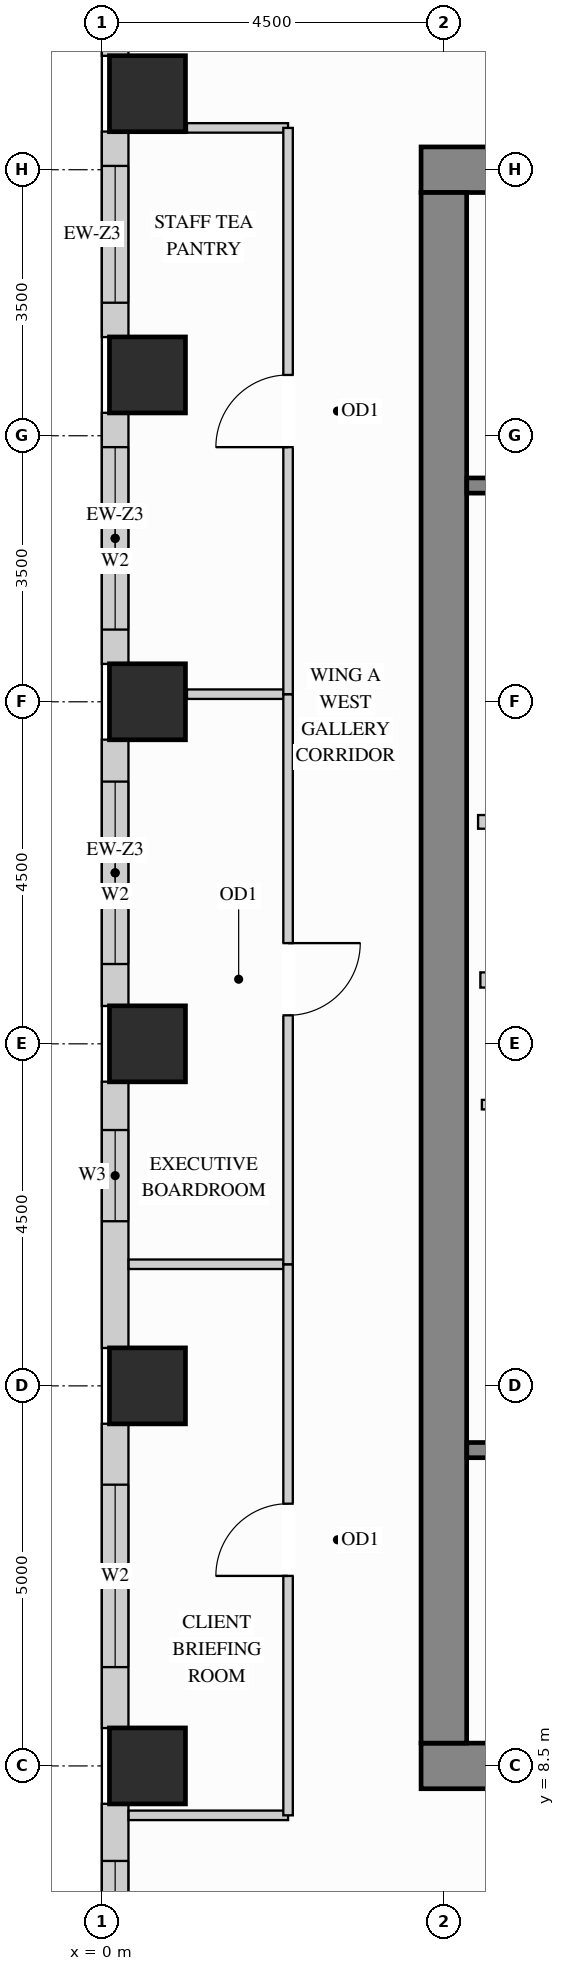
"""IFC4 building model, lengths in metres.
Left out: names, types, materials, properties, quantities, classifications, styles, units other than length and angle.
Written with IfcOpenShell. Run it as: python <this file> out.ifc"""

import sys

from ifc_helpers import new_model, si_unit, direction, frame, frame_2d, origin, origin_2d, place, context, subcontext, project, spatial, rectangle, extrude, source, transform, mapped, element, fill, save


model = new_model("IFC4")
c1 = context("Model", 3, precision=1e-05, world=origin(), true_north=direction((0.0, 1.0)))
c2 = subcontext(c1, "Body", "Model", "MODEL_VIEW")
j1 = project(units=[si_unit("LENGTHUNIT", "METRE"), si_unit("PLANEANGLEUNIT", "RADIAN")], contexts=[c1])
p1 = place(None, origin())
s1 = spatial("IfcSite", under=j1, at=p1, CompositionType="ELEMENT")
p2 = place(p1, origin())
s2 = spatial("IfcBuilding", under=s1, at=p2, CompositionType="ELEMENT")
p3 = place(p2, frame((0.0, 0.0, 171.9)))
s3 = spatial("IfcBuildingStorey", under=s2, at=p3, CompositionType="ELEMENT", Elevation=171.9)
m1 = source(origin(), c2, "Body", "SweptSolid", [
    extrude(rectangle(XDim=1.0, YDim=1.0, at=origin_2d()), origin(), (0.0, 0.0, 1.0), 3.4),
])
for number, where, z_axis, x_axis in (
    (1, (0.6, 13.5, 0.0), (0.0, 0.0, 1.0), (1.0, 0.0, 0.0)),
    (2, (0.6, 18.0, 0.0), (0.0, 0.0, 1.0), (1.0, 0.0, 0.0)),
    (3, (0.6, 22.5, 0.0), (0.0, 0.0, 1.0), (1.0, 0.0, 0.0)),
    (4, (0.6, 26.8, 0.0), (0.0, 0.0, 1.0), (1.0, 0.0, 0.0)),
    (5, (0.6, 30.5, 0.0), (0.0, 0.0, 1.0), (1.0, 0.0, 0.0)),
    (6, (0.6, 8.5, 0.0), (0.0, 0.0, 1.0), (1.0, 0.0, 0.0)),
):
    element("IfcColumn", number, at=place(p3, frame(where, z_axis=z_axis, x_axis=x_axis)), inside=s3, PredefinedType="COLUMN", context=c2, shape_type="MappedRepresentation", body=[
        mapped(m1, transform((0.0, 0.0, 0.0), x_axis=(1.0, 0.0, 0.0), y_axis=(0.0, 1.0, 0.0), z_axis=(0.0, 0.0, 1.0))),
    ])
m2 = source(origin(), c2, "Body", "SweptSolid", [
    extrude(rectangle(XDim=10.6, YDim=0.6, at=frame_2d((5.3, 0.0))), origin(), (0.0, 0.0, 1.0), 3.4),
])
for number, where, z_axis, x_axis in (
    (7, (4.2, 29.5, 0.0), (0.0, 0.0, 1.0), (1.0, 0.0, 0.0)),
    (8, (4.2, 8.5, 0.0), (0.0, 0.0, 1.0), (1.0, 0.0, 0.0)),
):
    element("IfcWall", number, at=place(p3, frame(where, z_axis=z_axis, x_axis=x_axis)), inside=s3, PredefinedType="SHEAR", context=c2, shape_type="MappedRepresentation", body=[
        mapped(m2, transform((0.0, 0.0, 0.0), x_axis=(1.0, 0.0, 0.0), y_axis=(0.0, 1.0, 0.0), z_axis=(0.0, 0.0, 1.0))),
    ])
m3 = source(origin(), c2, "Body", "SweptSolid", [
    extrude(rectangle(XDim=20.4, YDim=0.6, at=frame_2d((10.2, 0.0))), origin(), (0.0, 0.0, 1.0), 3.4),
])
p4 = place(p3, frame((4.5, 8.8, 0.0), z_axis=(0.0, 0.0, 1.0), x_axis=(0.0, 1.0, 0.0)))
e9 = element("IfcWall", 9, at=p4, inside=s3, PredefinedType="SHEAR", context=c2, shape_type="MappedRepresentation", body=[
    mapped(m3, transform((0.0, 0.0, 0.0), x_axis=(1.0, 0.0, 0.0), y_axis=(0.0, 1.0, 0.0), z_axis=(0.0, 0.0, 1.0))),
])
p5 = place(p3, frame((0.175, 34.502, 0.0), z_axis=(0.0, 0.0, 1.0), x_axis=(0.0, -1.0, 0.0)))
e10 = element("IfcWall", 10, at=p5, inside=s3, PredefinedType="SOLIDWALL", context=c2, shape_type="SweptSolid", body=[
    extrude(rectangle(XDim=3.504, YDim=0.35, at=frame_2d((1.752, 0.0))), origin(), (0.0, 0.0, 1.0), 2.612),
])
p6 = place(p5, frame((0.511, 0.0, 0.78)))
e11 = element("IfcOpeningElement", 11, at=p6, cuts=e10, PredefinedType="OPENING", context=c2, shape_type="SweptSolid", body=[
    extrude(rectangle(XDim=1.2, YDim=1.652, at=frame_2d((0.6, 0.826))), frame((0.0, 0.185, 0.0), z_axis=(0.0, -1.0, 0.0), x_axis=(1.0, 0.0, 0.0)), (0.0, 0.0, 1.0), 0.37),
])
p7 = place(p3, frame((0.175, 30.002, 0.0), z_axis=(0.0, 0.0, 1.0), x_axis=(0.0, -1.0, 0.0)))
e12 = element("IfcWall", 12, at=p7, inside=s3, PredefinedType="SOLIDWALL", context=c2, shape_type="SweptSolid", body=[
    extrude(rectangle(XDim=2.704, YDim=0.35, at=frame_2d((1.352, 0.0))), origin(), (0.0, 0.0, 1.0), 2.612),
])
p8 = place(p7, frame((0.452, 0.0, 0.78)))
e13 = element("IfcOpeningElement", 13, at=p8, cuts=e12, PredefinedType="OPENING", context=c2, shape_type="SweptSolid", body=[
    extrude(rectangle(XDim=1.8, YDim=1.652, at=frame_2d((0.9, 0.826))), frame((0.0, 0.185, 0.0), z_axis=(0.0, -1.0, 0.0), x_axis=(1.0, 0.0, 0.0)), (0.0, 0.0, 1.0), 0.37),
])
p9 = place(p3, frame((0.175, 26.302, 0.0), z_axis=(0.0, 0.0, 1.0), x_axis=(0.0, -1.0, 0.0)))
e14 = element("IfcWall", 14, at=p9, inside=s3, PredefinedType="SOLIDWALL", context=c2, shape_type="SweptSolid", body=[
    extrude(rectangle(XDim=3.304, YDim=0.35, at=frame_2d((1.652, 0.0))), origin(), (0.0, 0.0, 1.0), 2.612),
])
p10 = place(p9, frame((0.452, 0.0, 0.78)))
e15 = element("IfcOpeningElement", 15, at=p10, cuts=e14, PredefinedType="OPENING", context=c2, shape_type="SweptSolid", body=[
    extrude(rectangle(XDim=2.4, YDim=1.652, at=frame_2d((1.2, 0.826))), frame((0.0, 0.185, 0.0), z_axis=(0.0, -1.0, 0.0), x_axis=(1.0, 0.0, 0.0)), (0.0, 0.0, 1.0), 0.37),
])
p11 = place(p3, frame((0.175, 22.002, 0.0), z_axis=(0.0, 0.0, 1.0), x_axis=(0.0, -1.0, 0.0)))
e16 = element("IfcWall", 16, at=p11, inside=s3, PredefinedType="SOLIDWALL", context=c2, shape_type="SweptSolid", body=[
    extrude(rectangle(XDim=3.504, YDim=0.35, at=frame_2d((1.752, 0.0))), origin(), (0.0, 0.0, 1.0), 2.612),
])
p12 = place(p11, frame((0.552, 0.0, 0.78)))
e17 = element("IfcOpeningElement", 17, at=p12, cuts=e16, PredefinedType="OPENING", context=c2, shape_type="SweptSolid", body=[
    extrude(rectangle(XDim=2.4, YDim=1.652, at=frame_2d((1.2, 0.826))), frame((0.0, 0.185, 0.0), z_axis=(0.0, -1.0, 0.0), x_axis=(1.0, 0.0, 0.0)), (0.0, 0.0, 1.0), 0.37),
])
p13 = place(p3, frame((0.175, 17.502, 0.0), z_axis=(0.0, 0.0, 1.0), x_axis=(0.0, -1.0, 0.0)))
e18 = element("IfcWall", 18, at=p13, inside=s3, PredefinedType="SOLIDWALL", context=c2, shape_type="SweptSolid", body=[
    extrude(rectangle(XDim=3.504, YDim=0.35, at=frame_2d((1.752, 0.0))), origin(), (0.0, 0.0, 1.0), 2.612),
])
p14 = place(p13, frame((0.636, 0.0, 0.78)))
e19 = element("IfcOpeningElement", 19, at=p14, cuts=e18, PredefinedType="OPENING", context=c2, shape_type="SweptSolid", body=[
    extrude(rectangle(XDim=1.2, YDim=1.652, at=frame_2d((0.6, 0.826))), frame((0.0, 0.185, 0.0), z_axis=(0.0, -1.0, 0.0), x_axis=(1.0, 0.0, 0.0)), (0.0, 0.0, 1.0), 0.37),
])
p15 = place(p3, frame((0.175, 13.002, 0.0), z_axis=(0.0, 0.0, 1.0), x_axis=(0.0, -1.0, 0.0)))
e20 = element("IfcWall", 20, at=p15, inside=s3, PredefinedType="SOLIDWALL", context=c2, shape_type="SweptSolid", body=[
    extrude(rectangle(XDim=4.004, YDim=0.35, at=frame_2d((2.002, 0.0))), origin(), (0.0, 0.0, 1.0), 2.612),
])
p16 = place(p15, frame((0.802, 0.0, 0.78)))
e21 = element("IfcOpeningElement", 21, at=p16, cuts=e20, PredefinedType="OPENING", context=c2, shape_type="SweptSolid", body=[
    extrude(rectangle(XDim=2.4, YDim=1.652, at=frame_2d((1.2, 0.826))), frame((0.0, 0.185, 0.0), z_axis=(0.0, -1.0, 0.0), x_axis=(1.0, 0.0, 0.0)), (0.0, 0.0, 1.0), 0.37),
])
p17 = place(p3, frame((0.175, 8.002, 0.0), z_axis=(0.0, 0.0, 1.0), x_axis=(0.0, -1.0, 0.0)))
e22 = element("IfcWall", 22, at=p17, inside=s3, PredefinedType="SOLIDWALL", context=c2, shape_type="SweptSolid", body=[
    extrude(rectangle(XDim=4.004, YDim=0.35, at=frame_2d((2.002, 0.0))), origin(), (0.0, 0.0, 1.0), 2.612),
])
p18 = place(p17, frame((0.752, 0.0, 0.78)))
e23 = element("IfcOpeningElement", 23, at=p18, cuts=e22, PredefinedType="OPENING", context=c2, shape_type="SweptSolid", body=[
    extrude(rectangle(XDim=1.2, YDim=1.652, at=frame_2d((0.6, 0.826))), frame((0.0, 0.185, 0.0), z_axis=(0.0, -1.0, 0.0), x_axis=(1.0, 0.0, 0.0)), (0.0, 0.0, 1.0), 0.37),
])
m4 = source(origin(), c2, "Body", "SweptSolid", [
    extrude(rectangle(XDim=2.2, YDim=0.18, at=frame_2d((1.1, 0.0))), origin(), (0.0, 0.0, 1.0), 3.385),
])
p19 = place(p3, frame((4.95, 20.92, 0.0), z_axis=(0.0, 0.0, 1.0), x_axis=(1.0, 0.0, 0.0)))
e24 = element("IfcWall", 24, at=p19, inside=s3, PredefinedType="PARTITIONING", context=c2, shape_type="MappedRepresentation", body=[
    mapped(m4, transform((0.0, 0.0, 0.0), x_axis=(1.0, 0.0, 0.0), y_axis=(0.0, 1.0, 0.0), z_axis=(0.0, 0.0, 1.0))),
])
p20 = place(p3, frame((5.0, 17.2, 0.0), z_axis=(0.0, 0.0, 1.0), x_axis=(1.0, 0.0, 0.0)))
e25 = element("IfcWall", 25, at=p20, inside=s3, PredefinedType="PARTITIONING", context=c2, shape_type="SweptSolid", body=[
    extrude(rectangle(XDim=2.4, YDim=0.125, at=frame_2d((1.2, 0.0))), origin(), (0.0, 0.0, 1.0), 3.385),
])
p21 = place(p20, frame((0.7, 0.0, 0.0)))
e26 = element("IfcOpeningElement", 26, at=p21, cuts=e25, PredefinedType="OPENING", context=c2, shape_type="SweptSolid", body=[
    extrude(rectangle(XDim=0.85, YDim=2.1, at=frame_2d((0.425, 1.05))), frame((0.0, 0.073, 0.0), z_axis=(0.0, -1.0, 0.0), x_axis=(1.0, 0.0, 0.0)), (0.0, 0.0, 1.0), 0.145),
])
m5 = source(origin(), c2, "Body", "SweptSolid", [
    extrude(rectangle(XDim=1.33, YDim=0.125, at=frame_2d((0.665, 0.0))), origin(), (0.0, 0.0, 1.0), 3.385),
])
p22 = place(p3, frame((1.12, 30.05, 0.0), z_axis=(0.0, 0.0, 1.0), x_axis=(1.0, 0.0, 0.0)))
e27 = element("IfcWall", 27, at=p22, inside=s3, PredefinedType="PARTITIONING", context=c2, shape_type="MappedRepresentation", body=[
    mapped(m5, transform((0.0, 0.0, 0.0), x_axis=(1.0, 0.0, 0.0), y_axis=(0.0, 1.0, 0.0), z_axis=(0.0, 0.0, 1.0))),
])
m6 = source(origin(), c2, "Body", "SweptSolid", [
    extrude(rectangle(XDim=2.098, YDim=0.125, at=frame_2d((1.049, 0.0))), origin(), (0.0, 0.0, 1.0), 3.385),
])
for number, where, z_axis, x_axis in (
    (28, (0.352, 7.85, 0.0), (0.0, 0.0, 1.0), (1.0, 0.0, 0.0)),
    (29, (0.352, 15.1, 0.0), (0.0, 0.0, 1.0), (1.0, 0.0, 0.0)),
):
    element("IfcWall", number, at=place(p3, frame(where, z_axis=z_axis, x_axis=x_axis)), inside=s3, PredefinedType="PARTITIONING", context=c2, shape_type="MappedRepresentation", body=[
        mapped(m6, transform((0.0, 0.0, 0.0), x_axis=(1.0, 0.0, 0.0), y_axis=(0.0, 1.0, 0.0), z_axis=(0.0, 0.0, 1.0))),
    ])
p23 = place(p3, frame((1.12, 22.6, 0.0), z_axis=(0.0, 0.0, 1.0), x_axis=(1.0, 0.0, 0.0)))
e30 = element("IfcWall", 30, at=p23, inside=s3, PredefinedType="PARTITIONING", context=c2, shape_type="MappedRepresentation", body=[
    mapped(m5, transform((0.0, 0.0, 0.0), x_axis=(1.0, 0.0, 0.0), y_axis=(0.0, 1.0, 0.0), z_axis=(0.0, 0.0, 1.0))),
])
p24 = place(p3, frame((2.45, 7.85, 0.0), z_axis=(0.0, 0.0, 1.0), x_axis=(0.0, 1.0, 0.0)))
e31 = element("IfcWall", 31, at=p24, inside=s3, PredefinedType="PARTITIONING", context=c2, shape_type="SweptSolid", body=[
    extrude(rectangle(XDim=7.25, YDim=0.125, at=frame_2d((3.625, 0.0))), origin(), (0.0, 0.0, 1.0), 3.385),
])
p25 = place(p24, frame((3.15, 0.0, 0.0)))
e32 = element("IfcOpeningElement", 32, at=p25, cuts=e31, PredefinedType="OPENING", context=c2, shape_type="SweptSolid", body=[
    extrude(rectangle(XDim=0.95, YDim=2.15, at=frame_2d((0.475, 1.075))), frame((0.0, 0.073, 0.0), z_axis=(0.0, -1.0, 0.0), x_axis=(1.0, 0.0, 0.0)), (0.0, 0.0, 1.0), 0.145),
])
p26 = place(p3, frame((2.45, 15.1, 0.0), z_axis=(0.0, 0.0, 1.0), x_axis=(0.0, 1.0, 0.0)))
e33 = element("IfcWall", 33, at=p26, inside=s3, PredefinedType="PARTITIONING", context=c2, shape_type="SweptSolid", body=[
    extrude(rectangle(XDim=7.5, YDim=0.125, at=frame_2d((3.75, 0.0))), origin(), (0.0, 0.0, 1.0), 3.385),
])
p27 = place(p26, frame((3.275, 0.0, 0.0)))
e34 = element("IfcOpeningElement", 34, at=p27, cuts=e33, PredefinedType="OPENING", context=c2, shape_type="SweptSolid", body=[
    extrude(rectangle(XDim=0.95, YDim=2.15, at=frame_2d((0.475, 1.075))), frame((0.0, 0.073, 0.0), z_axis=(0.0, -1.0, 0.0), x_axis=(1.0, 0.0, 0.0)), (0.0, 0.0, 1.0), 0.145),
])
p28 = place(p3, frame((2.45, 22.6, 0.0), z_axis=(0.0, 0.0, 1.0), x_axis=(0.0, 1.0, 0.0)))
e35 = element("IfcWall", 35, at=p28, inside=s3, PredefinedType="PARTITIONING", context=c2, shape_type="SweptSolid", body=[
    extrude(rectangle(XDim=7.45, YDim=0.125, at=frame_2d((3.725, 0.0))), origin(), (0.0, 0.0, 1.0), 3.385),
])
p29 = place(p28, frame((3.25, 0.0, 0.0)))
e36 = element("IfcOpeningElement", 36, at=p29, cuts=e35, PredefinedType="OPENING", context=c2, shape_type="SweptSolid", body=[
    extrude(rectangle(XDim=0.95, YDim=2.15, at=frame_2d((0.475, 1.075))), frame((0.0, 0.073, 0.0), z_axis=(0.0, -1.0, 0.0), x_axis=(1.0, 0.0, 0.0)), (0.0, 0.0, 1.0), 0.145),
])
m7 = source(origin(), c2, "Body", "SweptSolid", [
    extrude(rectangle(XDim=2.09, YDim=0.2, at=frame_2d((1.045, 0.0))), origin(), (0.0, 0.0, 1.0), 3.385),
])
p30 = place(p3, frame((4.98, 18.84, 0.0), z_axis=(0.0, 0.0, 1.0), x_axis=(1.0, 0.0, 0.0)))
e37 = element("IfcWall", 37, at=p30, inside=s3, PredefinedType="PARTITIONING", context=c2, shape_type="MappedRepresentation", body=[
    mapped(m7, transform((0.0, 0.0, 0.0), x_axis=(1.0, 0.0, 0.0), y_axis=(0.0, 1.0, 0.0), z_axis=(0.0, 0.0, 1.0))),
])
p31 = place(p3, frame((4.802, 12.655, 0.0), z_axis=(0.0, 0.0, 1.0), x_axis=(1.0, 0.0, 0.0)))
e38 = element("IfcWall", 38, at=p31, inside=s3, PredefinedType="SHEAR", context=c2, shape_type="SweptSolid", body=[
    extrude(rectangle(XDim=7.603, YDim=0.2, at=frame_2d((3.802, 0.0))), origin(), (0.0, 0.0, 1.0), 3.4),
])
p32 = place(p31, frame((0.4, 0.0, 0.0)))
e39 = element("IfcOpeningElement", 39, at=p32, cuts=e38, PredefinedType="OPENING", context=c2, shape_type="SweptSolid", body=[
    extrude(rectangle(XDim=1.1, YDim=2.15, at=frame_2d((0.55, 1.075))), frame((0.0, 0.11, 0.0), z_axis=(0.0, -1.0, 0.0), x_axis=(1.0, 0.0, 0.0)), (0.0, 0.0, 1.0), 0.22),
])
p33 = place(p3, frame((4.802, 25.345, 0.0), z_axis=(0.0, 0.0, 1.0), x_axis=(1.0, 0.0, 0.0)))
e40 = element("IfcWall", 40, at=p33, inside=s3, PredefinedType="SHEAR", context=c2, shape_type="SweptSolid", body=[
    extrude(rectangle(XDim=7.603, YDim=0.2, at=frame_2d((3.802, 0.0))), origin(), (0.0, 0.0, 1.0), 3.4),
])
p34 = place(p33, frame((0.4, 0.0, 0.0)))
e41 = element("IfcOpeningElement", 41, at=p34, cuts=e40, PredefinedType="OPENING", context=c2, shape_type="SweptSolid", body=[
    extrude(rectangle(XDim=1.1, YDim=2.15, at=frame_2d((0.55, 1.075))), frame((0.0, 0.11, 0.0), z_axis=(0.0, -1.0, 0.0), x_axis=(1.0, 0.0, 0.0)), (0.0, 0.0, 1.0), 0.22),
])
m8 = source(origin(), c2, "Body", "SweptSolid", [
    extrude(rectangle(XDim=0.95, YDim=2.15, at=frame_2d((0.475, 1.075))), frame((0.0, 0.025, 0.0), z_axis=(0.0, -1.0, 0.0), x_axis=(1.0, 0.0, 0.0)), (0.0, 0.0, 1.0), 0.05),
])
p35 = place(p25, origin())
e42 = element("IfcDoor", 42, at=p35, inside=s3, OperationType="SINGLE_SWING_LEFT", PredefinedType="DOOR", context=c2, shape_type="MappedRepresentation", body=[
    mapped(m8, transform((0.0, 0.0, 0.0), x_axis=(1.0, 0.0, 0.0), y_axis=(0.0, 1.0, 0.0), z_axis=(0.0, 0.0, 1.0))),
])
fill(e32, e42)
p36 = place(p27, origin())
e43 = element("IfcDoor", 43, at=p36, inside=s3, OperationType="SINGLE_SWING_RIGHT", PredefinedType="DOOR", context=c2, shape_type="MappedRepresentation", body=[
    mapped(m8, transform((0.0, 0.0, 0.0), x_axis=(1.0, 0.0, 0.0), y_axis=(0.0, 1.0, 0.0), z_axis=(0.0, 0.0, 1.0))),
])
fill(e34, e43)
p37 = place(p29, origin())
e44 = element("IfcDoor", 44, at=p37, inside=s3, OperationType="SINGLE_SWING_LEFT", PredefinedType="DOOR", context=c2, shape_type="MappedRepresentation", body=[
    mapped(m8, transform((0.0, 0.0, 0.0), x_axis=(1.0, 0.0, 0.0), y_axis=(0.0, 1.0, 0.0), z_axis=(0.0, 0.0, 1.0))),
])
fill(e36, e44)
m9 = source(origin(), c2, "Body", "SweptSolid", [
    extrude(rectangle(XDim=1.8, YDim=1.652, at=frame_2d((0.9, 0.826))), frame((0.0, 0.03, 0.0), z_axis=(0.0, -1.0, 0.0), x_axis=(1.0, 0.0, 0.0)), (0.0, 0.0, 1.0), 0.06),
])
p38 = place(p8, origin())
e45 = element("IfcWindow", 45, at=p38, inside=s3, PartitioningType="SINGLE_PANEL", PredefinedType="WINDOW", context=c2, shape_type="MappedRepresentation", body=[
    mapped(m9, transform((0.0, 0.0, 0.0), x_axis=(1.0, 0.0, 0.0), y_axis=(0.0, 1.0, 0.0), z_axis=(0.0, 0.0, 1.0))),
])
fill(e13, e45)
m10 = source(origin(), c2, "Body", "SweptSolid", [
    extrude(rectangle(XDim=2.4, YDim=1.652, at=frame_2d((1.2, 0.826))), frame((0.0, 0.03, 0.0), z_axis=(0.0, -1.0, 0.0), x_axis=(1.0, 0.0, 0.0)), (0.0, 0.0, 1.0), 0.06),
])
p39 = place(p10, origin())
e46 = element("IfcWindow", 46, at=p39, inside=s3, PartitioningType="SINGLE_PANEL", PredefinedType="WINDOW", context=c2, shape_type="MappedRepresentation", body=[
    mapped(m10, transform((0.0, 0.0, 0.0), x_axis=(1.0, 0.0, 0.0), y_axis=(0.0, 1.0, 0.0), z_axis=(0.0, 0.0, 1.0))),
])
fill(e15, e46)
p40 = place(p12, origin())
e47 = element("IfcWindow", 47, at=p40, inside=s3, PartitioningType="SINGLE_PANEL", PredefinedType="WINDOW", context=c2, shape_type="MappedRepresentation", body=[
    mapped(m10, transform((0.0, 0.0, 0.0), x_axis=(1.0, 0.0, 0.0), y_axis=(0.0, 1.0, 0.0), z_axis=(0.0, 0.0, 1.0))),
])
fill(e17, e47)
p41 = place(p16, origin())
e48 = element("IfcWindow", 48, at=p41, inside=s3, PartitioningType="SINGLE_PANEL", PredefinedType="WINDOW", context=c2, shape_type="MappedRepresentation", body=[
    mapped(m10, transform((0.0, 0.0, 0.0), x_axis=(1.0, 0.0, 0.0), y_axis=(0.0, 1.0, 0.0), z_axis=(0.0, 0.0, 1.0))),
])
fill(e21, e48)
m11 = source(origin(), c2, "Body", "SweptSolid", [
    extrude(rectangle(XDim=1.2, YDim=1.652, at=frame_2d((0.6, 0.826))), frame((0.0, 0.03, 0.0), z_axis=(0.0, -1.0, 0.0), x_axis=(1.0, 0.0, 0.0)), (0.0, 0.0, 1.0), 0.06),
])
p42 = place(p14, origin())
e49 = element("IfcWindow", 49, at=p42, inside=s3, PartitioningType="SINGLE_PANEL", PredefinedType="WINDOW", context=c2, shape_type="MappedRepresentation", body=[
    mapped(m11, transform((0.0, 0.0, 0.0), x_axis=(1.0, 0.0, 0.0), y_axis=(0.0, 1.0, 0.0), z_axis=(0.0, 0.0, 1.0))),
])
fill(e19, e49)
p43 = place(p18, origin())
e50 = element("IfcWindow", 50, at=p43, inside=s3, PartitioningType="SINGLE_PANEL", PredefinedType="WINDOW", context=c2, shape_type="MappedRepresentation", body=[
    mapped(m11, transform((0.0, 0.0, 0.0), x_axis=(1.0, 0.0, 0.0), y_axis=(0.0, 1.0, 0.0), z_axis=(0.0, 0.0, 1.0))),
])
fill(e23, e50)
save(model, sys.argv[1])
